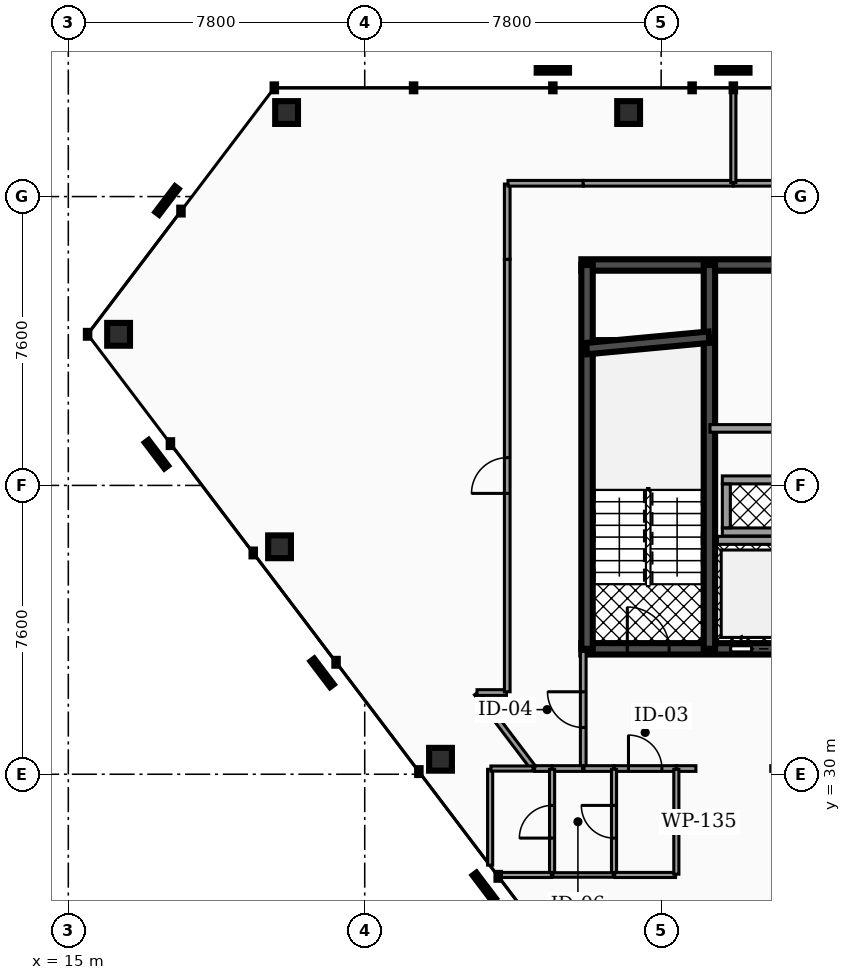
"""IFC4 building model, lengths in metres.
Left out: names, types, materials, properties, quantities, classifications, styles, units other than length and angle.
Written with IfcOpenShell. Run it as: python <this file> out.ifc"""

import sys

from ifc_helpers import new_model, si_unit, direction, frame, frame_2d, origin, origin_2d, place, context, subcontext, project, spatial, rectangle, hollow_rectangle, extrude, element, fill, save


model = new_model("IFC4")
c1 = context("Model", 3, precision=1e-05, world=origin(), true_north=direction((0.0, 1.0)))
c2 = subcontext(c1, "Body", "Model", "MODEL_VIEW")
j1 = project(units=[si_unit("LENGTHUNIT", "METRE"), si_unit("PLANEANGLEUNIT", "RADIAN")], contexts=[c1])
p1 = place(None, origin())
s1 = spatial("IfcSite", under=j1, at=p1, CompositionType="ELEMENT")
p2 = place(p1, origin())
s2 = spatial("IfcBuilding", under=s1, at=p2, CompositionType="ELEMENT")
p3 = place(p2, frame((0.0, 0.0, 242.76)))
s3 = spatial("IfcBuildingStorey", under=s2, at=p3, CompositionType="ELEMENT", Elevation=242.76)
p4 = place(p3, frame((28.5, 43.4, 0.0), z_axis=(0.0, 0.0, 1.0), x_axis=(1.0, 0.0, 0.0)))
e1 = element("IfcWall", 1, at=p4, inside=s3, PredefinedType="SHEAR", context=c2, shape_type="SweptSolid", body=[
    extrude(rectangle(XDim=19.86, YDim=0.3, at=frame_2d((9.93, 0.0))), origin(), (0.0, 0.0, 1.0), 3.18),
])
p5 = place(p3, frame((28.5, 33.3, 0.0), z_axis=(0.0, 0.0, 1.0), x_axis=(1.0, 0.0, 0.0)))
e2 = element("IfcWall", 2, at=p5, inside=s3, PredefinedType="SHEAR", context=c2, shape_type="SweptSolid", body=[
    extrude(rectangle(XDim=19.86, YDim=0.3, at=frame_2d((9.93, 0.0))), origin(), (0.0, 0.0, 1.0), 3.18),
])
p6 = place(p5, frame((3.93, 0.0, 0.0)))
e3 = element("IfcOpeningElement", 3, at=p6, cuts=e2, PredefinedType="OPENING", context=c2, shape_type="SweptSolid", body=[
    extrude(rectangle(XDim=1.1, YDim=2.15, at=frame_2d((0.55, 1.075))), frame((0.0, 0.16, 0.0), z_axis=(0.0, -1.0, 0.0), x_axis=(1.0, 0.0, 0.0)), (0.0, 0.0, 1.0), 0.32),
])
p7 = place(p5, frame((14.77, 0.0, 0.0)))
e4 = element("IfcOpeningElement", 4, at=p7, cuts=e2, PredefinedType="OPENING", context=c2, shape_type="SweptSolid", body=[
    extrude(rectangle(XDim=1.1, YDim=2.15, at=frame_2d((0.55, 1.075))), frame((0.0, 0.16, 0.0), z_axis=(0.0, -1.0, 0.0), x_axis=(1.0, 0.0, 0.0)), (0.0, 0.0, 1.0), 0.32),
])
p8 = place(p5, frame((11.25, 0.0, 0.0)))
e5 = element("IfcOpeningElement", 5, at=p8, cuts=e2, PredefinedType="OPENING", context=c2, shape_type="SweptSolid", body=[
    extrude(rectangle(XDim=1.0, YDim=2.1, at=frame_2d((0.5, 1.05))), frame((0.0, 0.16, 0.0), z_axis=(0.0, -1.0, 0.0), x_axis=(1.0, 0.0, 0.0)), (0.0, 0.0, 1.0), 0.32),
])
p9 = place(p5, frame((12.95, 0.0, 0.0)))
e6 = element("IfcOpeningElement", 6, at=p9, cuts=e2, PredefinedType="OPENING", context=c2, shape_type="SweptSolid", body=[
    extrude(rectangle(XDim=1.0, YDim=2.1, at=frame_2d((0.5, 1.05))), frame((0.0, 0.16, 0.0), z_axis=(0.0, -1.0, 0.0), x_axis=(1.0, 0.0, 0.0)), (0.0, 0.0, 1.0), 0.32),
])
p10 = place(p5, frame((5.85, 0.0, 0.0)))
e7 = element("IfcOpeningElement", 7, at=p10, cuts=e2, PredefinedType="OPENING", context=c2, shape_type="SweptSolid", body=[
    extrude(rectangle(XDim=1.0, YDim=2.1, at=frame_2d((0.5, 1.05))), frame((0.0, 0.16, 0.0), z_axis=(0.0, -1.0, 0.0), x_axis=(1.0, 0.0, 0.0)), (0.0, 0.0, 1.0), 0.32),
])
p11 = place(p5, frame((1.21, 0.0, 0.0)))
e8 = element("IfcOpeningElement", 8, at=p11, cuts=e2, PredefinedType="OPENING", context=c2, shape_type="SweptSolid", body=[
    extrude(rectangle(XDim=1.1, YDim=2.2, at=frame_2d((0.55, 1.1))), frame((0.0, 0.16, 0.0), z_axis=(0.0, -1.0, 0.0), x_axis=(1.0, 0.0, 0.0)), (0.0, 0.0, 1.0), 0.32),
])
p12 = place(p5, frame((9.34, 0.0, 0.0)))
e9 = element("IfcOpeningElement", 9, at=p12, cuts=e2, PredefinedType="OPENING", context=c2, shape_type="SweptSolid", body=[
    extrude(rectangle(XDim=1.12, YDim=2.05, at=frame_2d((0.56, 1.025))), frame((0.0, 0.16, 0.0), z_axis=(0.0, -1.0, 0.0), x_axis=(1.0, 0.0, 0.0)), (0.0, 0.0, 1.0), 0.32),
])
p13 = place(p5, frame((17.55, 0.0, 0.0)))
e10 = element("IfcOpeningElement", 10, at=p13, cuts=e2, PredefinedType="OPENING", context=c2, shape_type="SweptSolid", body=[
    extrude(rectangle(XDim=1.1, YDim=2.2, at=frame_2d((0.55, 1.1))), frame((0.0, 0.16, 0.0), z_axis=(0.0, -1.0, 0.0), x_axis=(1.0, 0.0, 0.0)), (0.0, 0.0, 1.0), 0.32),
])
for number, where, z_axis, x_axis in (
    (11, (28.65, 33.3, 0.0), (0.0, 0.0, 1.0), (0.0, 1.0, 0.0)),
    (12, (31.87, 33.3, 0.0), (0.0, 0.0, 1.0), (0.0, 1.0, 0.0)),
):
    element("IfcWall", number, at=place(p3, frame(where, z_axis=z_axis, x_axis=x_axis)), inside=s3, PredefinedType="SHEAR", context=c2, shape_type="SweptSolid", body=[
        extrude(rectangle(XDim=10.1, YDim=0.3, at=frame_2d((5.05, 0.0))), origin(), (0.0, 0.0, 1.0), 3.18),
    ])
p14 = place(p3, frame((28.64, 41.2, 0.0), z_axis=(0.0, 0.0, 1.0), x_axis=(0.995687118776, 0.092774789157, 0.0)))
e13 = element("IfcWall", 13, at=p14, inside=s3, PredefinedType="SHEAR", context=c2, shape_type="SweptSolid", body=[
    extrude(rectangle(XDim=3.234, YDim=0.3, at=frame_2d((1.617, 0.0))), origin(), (0.0, 0.0, 1.0), 3.18),
])
for number, where, z_axis, x_axis in (
    (14, (29.744, 47.411, 0.0), (0.0, 0.0, 1.0), (1.0, 0.0, 0.0)),
    (15, (20.744, 47.411, 0.0), (0.0, 0.0, 1.0), (1.0, 0.0, 0.0)),
    (16, (16.323, 41.576, 0.0), (0.0, 0.0, 1.0), (1.0, 0.0, 0.0)),
    (17, (20.559, 35.985, 0.0), (0.0, 0.0, 1.0), (1.0, 0.0, 0.0)),
    (18, (24.794, 30.394, 0.0), (0.0, 0.0, 1.0), (1.0, 0.0, 0.0)),
):
    element("IfcColumn", number, at=place(p3, frame(where, z_axis=z_axis, x_axis=x_axis)), inside=s3, PredefinedType="COLUMN", context=c2, shape_type="SweptSolid", body=[
        extrude(hollow_rectangle(XDim=0.6, YDim=0.6, WallThickness=0.03, at=origin_2d()), origin(), (0.0, 0.0, 1.0), 3.18),
    ])
p15 = place(p3, frame((32.08, 36.155, 0.0), z_axis=(0.0, 0.0, 1.0), x_axis=(1.0, 0.0, 0.0)))
e19 = element("IfcWall", 19, at=p15, inside=s3, PredefinedType="SOLIDWALL", context=c2, shape_type="SweptSolid", body=[
    extrude(rectangle(XDim=1.8, YDim=0.21, at=frame_2d((0.9, 0.0))), origin(), (0.0, 0.0, 1.0), 3.18),
])
for number, where, z_axis, x_axis in (
    (20, (32.21, 36.375, 0.0), (0.0, 0.0, 1.0), (1.0, 0.0, 0.0)),
    (21, (32.21, 37.745, 0.0), (0.0, 0.0, 1.0), (1.0, 0.0, 0.0)),
):
    element("IfcWall", number, at=place(p3, frame(where, z_axis=z_axis, x_axis=x_axis)), inside=s3, PredefinedType="SOLIDWALL", context=c2, shape_type="SweptSolid", body=[
        extrude(rectangle(XDim=1.6, YDim=0.21, at=frame_2d((0.8, 0.0))), origin(), (0.0, 0.0, 1.0), 3.18),
    ])
p16 = place(p3, frame((32.315, 36.485, 0.0), z_axis=(0.0, 0.0, 1.0), x_axis=(0.0, 1.0, 0.0)))
e22 = element("IfcWall", 22, at=p16, inside=s3, PredefinedType="SOLIDWALL", context=c2, shape_type="SweptSolid", body=[
    extrude(rectangle(XDim=1.15, YDim=0.21, at=frame_2d((0.575, 0.0))), origin(), (0.0, 0.0, 1.0), 3.18),
])
p17 = place(p3, frame((31.885, 39.1, 0.0), z_axis=(0.0, 0.0, 1.0), x_axis=(1.0, 0.0, 0.0)))
e23 = element("IfcWall", 23, at=p17, inside=s3, PredefinedType="PARTITIONING", context=c2, shape_type="SweptSolid", body=[
    extrude(rectangle(XDim=5.645, YDim=0.2, at=frame_2d((2.823, 0.0))), origin(), (0.0, 0.0, 1.0), 2.235),
])
p18 = place(p3, frame((28.55, 30.17, 0.0), z_axis=(0.0, 0.0, 1.0), x_axis=(0.0, 1.0, 0.0)))
e24 = element("IfcWall", 24, at=p18, inside=s3, PredefinedType="PARTITIONING", context=c2, shape_type="SweptSolid", body=[
    extrude(rectangle(XDim=3.06, YDim=0.15, at=frame_2d((1.53, 0.0))), origin(), (0.0, 0.0, 1.0), 2.235),
])
p19 = place(p18, frame((1.06, 0.0, 0.0)))
e25 = element("IfcOpeningElement", 25, at=p19, cuts=e24, PredefinedType="OPENING", context=c2, shape_type="SweptSolid", body=[
    extrude(rectangle(XDim=0.94, YDim=2.05, at=frame_2d((0.47, 1.025))), frame((0.0, 0.085, 0.0), z_axis=(0.0, -1.0, 0.0), x_axis=(1.0, 0.0, 0.0)), (0.0, 0.0, 1.0), 0.17),
])
p20 = place(p3, frame((29.365, 30.15, 0.0), z_axis=(0.0, 0.0, 1.0), x_axis=(1.0, 0.0, 0.0)))
e26 = element("IfcWall", 26, at=p20, inside=s3, PredefinedType="PARTITIONING", context=c2, shape_type="SweptSolid", body=[
    extrude(rectangle(XDim=1.63, YDim=0.15, at=frame_2d((0.815, 0.0))), origin(), (0.0, 0.0, 1.0), 2.235),
])
p21 = place(p20, frame((0.375, 0.0, 0.0)))
e27 = element("IfcOpeningElement", 27, at=p21, cuts=e26, PredefinedType="OPENING", context=c2, shape_type="SweptSolid", body=[
    extrude(rectangle(XDim=0.88, YDim=2.05, at=frame_2d((0.44, 1.025))), frame((0.0, 0.085, 0.0), z_axis=(0.0, -1.0, 0.0), x_axis=(1.0, 0.0, 0.0)), (0.0, 0.0, 1.0), 0.17),
])
p22 = place(p3, frame((28.57, 30.15, 0.0), z_axis=(0.0, 0.0, 1.0), x_axis=(1.0, 0.0, 0.0)))
e28 = element("IfcWall", 28, at=p22, inside=s3, PredefinedType="PARTITIONING", context=c2, shape_type="SweptSolid", body=[
    extrude(rectangle(XDim=0.785, YDim=0.15, at=frame_2d((0.393, 0.0))), origin(), (0.0, 0.0, 1.0), 2.235),
])
p23 = place(p3, frame((33.485, 30.15, 0.0), z_axis=(0.0, 0.0, 1.0), x_axis=(1.0, 0.0, 0.0)))
e29 = element("IfcWall", 29, at=p23, inside=s3, PredefinedType="PARTITIONING", context=c2, shape_type="SweptSolid", body=[
    extrude(rectangle(XDim=9.83, YDim=0.15, at=frame_2d((4.915, 0.0))), origin(), (0.0, 0.0, 1.0), 2.235),
])
p24 = place(p23, frame((0.445, 0.0, 0.0)))
e30 = element("IfcOpeningElement", 30, at=p24, cuts=e29, PredefinedType="OPENING", context=c2, shape_type="SweptSolid", body=[
    extrude(rectangle(XDim=0.94, YDim=2.05, at=frame_2d((0.47, 1.025))), frame((0.0, 0.085, 0.0), z_axis=(0.0, -1.0, 0.0), x_axis=(1.0, 0.0, 0.0)), (0.0, 0.0, 1.0), 0.17),
])
p25 = place(p3, frame((31.005, 30.15, 0.0), z_axis=(0.0, 0.0, 1.0), x_axis=(1.0, 0.0, 0.0)))
e31 = element("IfcWall", 31, at=p25, inside=s3, PredefinedType="PARTITIONING", context=c2, shape_type="SweptSolid", body=[
    extrude(rectangle(XDim=0.51, YDim=0.15, at=frame_2d((0.255, 0.0))), origin(), (0.0, 0.0, 1.0), 2.235),
])
p26 = place(p3, frame((27.27, 30.15, 0.0), z_axis=(0.0, 0.0, 1.0), x_axis=(1.0, 0.0, 0.0)))
e32 = element("IfcWall", 32, at=p26, inside=s3, PredefinedType="PARTITIONING", context=c2, shape_type="SweptSolid", body=[
    extrude(rectangle(XDim=0.455, YDim=0.15, at=frame_2d((0.228, 0.0))), origin(), (0.0, 0.0, 1.0), 2.235),
])
p27 = place(p3, frame((27.735, 30.15, 0.0), z_axis=(0.0, 0.0, 1.0), x_axis=(1.0, 0.0, 0.0)))
e33 = element("IfcWall", 33, at=p27, inside=s3, PredefinedType="PARTITIONING", context=c2, shape_type="SweptSolid", body=[
    extrude(rectangle(XDim=0.795, YDim=0.15, at=frame_2d((0.397, 0.0))), origin(), (0.0, 0.0, 1.0), 2.235),
])
p28 = place(p3, frame((25.747, 32.134, 0.0), z_axis=(0.0, 0.0, 1.0), x_axis=(0.603931928578, -0.797035899847, 0.0)))
e34 = element("IfcWall", 34, at=p28, inside=s3, PredefinedType="PARTITIONING", context=c2, shape_type="SweptSolid", body=[
    extrude(rectangle(XDim=2.469, YDim=0.15, at=frame_2d((1.235, 0.0))), origin(), (0.0, 0.0, 1.0), 2.235),
])
p29 = place(p3, frame((25.755, 32.15, 0.0), z_axis=(0.0, 0.0, 1.0), x_axis=(1.0, 0.0, 0.0)))
e35 = element("IfcWall", 35, at=p29, inside=s3, PredefinedType="PARTITIONING", context=c2, shape_type="SweptSolid", body=[
    extrude(rectangle(XDim=0.775, YDim=0.15, at=frame_2d((0.388, 0.0))), origin(), (0.0, 0.0, 1.0), 2.235),
])
p30 = place(p3, frame((26.55, 32.17, 0.0), z_axis=(0.0, 0.0, 1.0), x_axis=(0.0, 1.0, 0.0)))
e36 = element("IfcWall", 36, at=p30, inside=s3, PredefinedType="PARTITIONING", context=c2, shape_type="SweptSolid", body=[
    extrude(rectangle(XDim=11.38, YDim=0.15, at=frame_2d((5.69, 0.0))), origin(), (0.0, 0.0, 1.0), 2.235),
])
p31 = place(p30, frame((5.22, 0.0, 0.0)))
e37 = element("IfcOpeningElement", 37, at=p31, cuts=e36, PredefinedType="OPENING", context=c2, shape_type="SweptSolid", body=[
    extrude(rectangle(XDim=0.94, YDim=2.05, at=frame_2d((0.47, 1.025))), frame((0.0, 0.085, 0.0), z_axis=(0.0, -1.0, 0.0), x_axis=(1.0, 0.0, 0.0)), (0.0, 0.0, 1.0), 0.17),
])
for number, where, z_axis, x_axis in (
    (38, (26.55, 43.55, 0.0), (0.0, 0.0, 1.0), (0.0, 1.0, 0.0)),
    (39, (26.57, 45.55, 0.0), (0.0, 0.0, 1.0), (1.0, 0.0, 0.0)),
):
    element("IfcWall", number, at=place(p3, frame(where, z_axis=z_axis, x_axis=x_axis)), inside=s3, PredefinedType="PARTITIONING", context=c2, shape_type="SweptSolid", body=[
        extrude(rectangle(XDim=1.98, YDim=0.15, at=frame_2d((0.99, 0.0))), origin(), (0.0, 0.0, 1.0), 2.235),
    ])
p32 = place(p3, frame((28.55, 45.55, 0.0), z_axis=(0.0, 0.0, 1.0), x_axis=(1.0, 0.0, 0.0)))
e40 = element("IfcWall", 40, at=p32, inside=s3, PredefinedType="PARTITIONING", context=c2, shape_type="SweptSolid", body=[
    extrude(rectangle(XDim=3.945, YDim=0.15, at=frame_2d((1.973, 0.0))), origin(), (0.0, 0.0, 1.0), 2.235),
])
p33 = place(p3, frame((32.505, 45.55, 0.0), z_axis=(0.0, 0.0, 1.0), x_axis=(1.0, 0.0, 0.0)))
e41 = element("IfcWall", 41, at=p33, inside=s3, PredefinedType="PARTITIONING", context=c2, shape_type="SweptSolid", body=[
    extrude(rectangle(XDim=2.114, YDim=0.15, at=frame_2d((1.057, 0.0))), origin(), (0.0, 0.0, 1.0), 2.235),
])
p34 = place(p3, frame((29.36, 27.37, 0.0), z_axis=(0.0, 0.0, 1.0), x_axis=(0.0, 1.0, 0.0)))
e42 = element("IfcWall", 42, at=p34, inside=s3, PredefinedType="PARTITIONING", context=c2, shape_type="SweptSolid", body=[
    extrude(rectangle(XDim=2.76, YDim=0.135, at=frame_2d((1.38, 0.0))), origin(), (0.0, 0.0, 1.0), 2.235),
])
p35 = place(p34, frame((0.95, 0.0, 0.0)))
e43 = element("IfcOpeningElement", 43, at=p35, cuts=e42, PredefinedType="OPENING", context=c2, shape_type="SweptSolid", body=[
    extrude(rectangle(XDim=0.86, YDim=2.05, at=frame_2d((0.43, 1.025))), frame((0.0, 0.077, 0.0), z_axis=(0.0, -1.0, 0.0), x_axis=(1.0, 0.0, 0.0)), (0.0, 0.0, 1.0), 0.155),
])
p36 = place(p3, frame((29.38, 27.35, 0.0), z_axis=(0.0, 0.0, 1.0), x_axis=(1.0, 0.0, 0.0)))
e44 = element("IfcWall", 44, at=p36, inside=s3, PredefinedType="PARTITIONING", context=c2, shape_type="SweptSolid", body=[
    extrude(rectangle(XDim=1.6, YDim=0.135, at=frame_2d((0.8, 0.0))), origin(), (0.0, 0.0, 1.0), 2.235),
])
p37 = place(p3, frame((31.0, 27.37, 0.0), z_axis=(0.0, 0.0, 1.0), x_axis=(0.0, 1.0, 0.0)))
e45 = element("IfcWall", 45, at=p37, inside=s3, PredefinedType="PARTITIONING", context=c2, shape_type="SweptSolid", body=[
    extrude(rectangle(XDim=2.76, YDim=0.135, at=frame_2d((1.38, 0.0))), origin(), (0.0, 0.0, 1.0), 2.235),
])
p38 = place(p3, frame((27.73, 27.37, 0.0), z_axis=(0.0, 0.0, 1.0), x_axis=(0.0, 1.0, 0.0)))
e46 = element("IfcWall", 46, at=p38, inside=s3, PredefinedType="PARTITIONING", context=c2, shape_type="SweptSolid", body=[
    extrude(rectangle(XDim=2.76, YDim=0.135, at=frame_2d((1.38, 0.0))), origin(), (0.0, 0.0, 1.0), 2.235),
])
p39 = place(p38, frame((0.95, 0.0, 0.0)))
e47 = element("IfcOpeningElement", 47, at=p39, cuts=e46, PredefinedType="OPENING", context=c2, shape_type="SweptSolid", body=[
    extrude(rectangle(XDim=0.86, YDim=2.05, at=frame_2d((0.43, 1.025))), frame((0.0, 0.077, 0.0), z_axis=(0.0, -1.0, 0.0), x_axis=(1.0, 0.0, 0.0)), (0.0, 0.0, 1.0), 0.155),
])
p40 = place(p3, frame((26.3, 27.35, 0.0), z_axis=(0.0, 0.0, 1.0), x_axis=(1.0, 0.0, 0.0)))
e48 = element("IfcWall", 48, at=p40, inside=s3, PredefinedType="PARTITIONING", context=c2, shape_type="SweptSolid", body=[
    extrude(rectangle(XDim=1.41, YDim=0.135, at=frame_2d((0.705, 0.0))), origin(), (0.0, 0.0, 1.0), 2.235),
])
p41 = place(p3, frame((26.1, 27.609, 0.0), z_axis=(0.0, 0.0, 1.0), x_axis=(0.0, 1.0, 0.0)))
e49 = element("IfcWall", 49, at=p41, inside=s3, PredefinedType="PARTITIONING", context=c2, shape_type="SweptSolid", body=[
    extrude(rectangle(XDim=2.521, YDim=0.135, at=frame_2d((1.26, 0.0))), origin(), (0.0, 0.0, 1.0), 2.235),
])
p42 = place(p3, frame((26.12, 30.15, 0.0), z_axis=(0.0, 0.0, 1.0), x_axis=(1.0, 0.0, 0.0)))
e50 = element("IfcWall", 50, at=p42, inside=s3, PredefinedType="PARTITIONING", context=c2, shape_type="SweptSolid", body=[
    extrude(rectangle(XDim=1.11, YDim=0.135, at=frame_2d((0.555, 0.0))), origin(), (0.0, 0.0, 1.0), 2.235),
])
p43 = place(p3, frame((27.75, 27.35, 0.0), z_axis=(0.0, 0.0, 1.0), x_axis=(1.0, 0.0, 0.0)))
e51 = element("IfcWall", 51, at=p43, inside=s3, PredefinedType="PARTITIONING", context=c2, shape_type="SweptSolid", body=[
    extrude(rectangle(XDim=1.59, YDim=0.12, at=frame_2d((0.795, 0.0))), origin(), (0.0, 0.0, 1.0), 2.235),
])
p44 = place(p3, frame((32.5, 45.57, 0.0), z_axis=(0.0, 0.0, 1.0), x_axis=(0.0, 1.0, 0.0)))
e52 = element("IfcWall", 52, at=p44, inside=s3, PredefinedType="PARTITIONING", context=c2, shape_type="SweptSolid", body=[
    extrude(rectangle(XDim=2.476, YDim=0.135, at=frame_2d((1.238, 0.0))), origin(), (0.0, 0.0, 1.0), 2.235),
])
p45 = place(p6, origin())
e53 = element("IfcDoor", 53, at=p45, inside=s3, OperationType="SLIDING_TO_LEFT", PredefinedType="DOOR", context=c2, shape_type="SweptSolid", body=[
    extrude(rectangle(XDim=1.1, YDim=2.15, at=frame_2d((0.55, 1.075))), frame((0.0, 0.025, 0.0), z_axis=(0.0, -1.0, 0.0), x_axis=(1.0, 0.0, 0.0)), (0.0, 0.0, 1.0), 0.05),
])
fill(e3, e53)
p46 = place(p11, origin())
e54 = element("IfcDoor", 54, at=p46, inside=s3, OperationType="SINGLE_SWING_LEFT", PredefinedType="DOOR", context=c2, shape_type="SweptSolid", body=[
    extrude(rectangle(XDim=1.1, YDim=2.2, at=frame_2d((0.55, 1.1))), frame((0.0, 0.025, 0.0), z_axis=(0.0, -1.0, 0.0), x_axis=(1.0, 0.0, 0.0)), (0.0, 0.0, 1.0), 0.05),
])
fill(e8, e54)
p47 = place(p19, origin())
e55 = element("IfcDoor", 55, at=p47, inside=s3, OperationType="SINGLE_SWING_RIGHT", PredefinedType="DOOR", context=c2, shape_type="SweptSolid", body=[
    extrude(rectangle(XDim=0.94, YDim=2.05, at=frame_2d((0.47, 1.025))), frame((0.0, 0.025, 0.0), z_axis=(0.0, -1.0, 0.0), x_axis=(1.0, 0.0, 0.0)), (0.0, 0.0, 1.0), 0.05),
])
fill(e25, e55)
p48 = place(p21, origin())
e56 = element("IfcDoor", 56, at=p48, inside=s3, OperationType="SINGLE_SWING_LEFT", PredefinedType="DOOR", context=c2, shape_type="SweptSolid", body=[
    extrude(rectangle(XDim=0.88, YDim=2.05, at=frame_2d((0.44, 1.025))), frame((0.0, 0.025, 0.0), z_axis=(0.0, -1.0, 0.0), x_axis=(1.0, 0.0, 0.0)), (0.0, 0.0, 1.0), 0.05),
])
fill(e27, e56)
p49 = place(p31, origin())
e57 = element("IfcDoor", 57, at=p49, inside=s3, OperationType="SINGLE_SWING_LEFT", PredefinedType="DOOR", context=c2, shape_type="SweptSolid", body=[
    extrude(rectangle(XDim=0.94, YDim=2.05, at=frame_2d((0.47, 1.025))), frame((0.0, 0.025, 0.0), z_axis=(0.0, -1.0, 0.0), x_axis=(1.0, 0.0, 0.0)), (0.0, 0.0, 1.0), 0.05),
])
fill(e37, e57)
p50 = place(p35, origin())
e58 = element("IfcDoor", 58, at=p50, inside=s3, OperationType="SINGLE_SWING_RIGHT", PredefinedType="DOOR", context=c2, shape_type="SweptSolid", body=[
    extrude(rectangle(XDim=0.86, YDim=2.05, at=frame_2d((0.43, 1.025))), frame((0.0, 0.025, 0.0), z_axis=(0.0, -1.0, 0.0), x_axis=(1.0, 0.0, 0.0)), (0.0, 0.0, 1.0), 0.05),
])
fill(e43, e58)
p51 = place(p39, origin())
e59 = element("IfcDoor", 59, at=p51, inside=s3, OperationType="SINGLE_SWING_LEFT", PredefinedType="DOOR", context=c2, shape_type="SweptSolid", body=[
    extrude(rectangle(XDim=0.86, YDim=2.05, at=frame_2d((0.43, 1.025))), frame((0.0, 0.025, 0.0), z_axis=(0.0, -1.0, 0.0), x_axis=(1.0, 0.0, 0.0)), (0.0, 0.0, 1.0), 0.05),
])
fill(e47, e59)
save(model, sys.argv[1])
